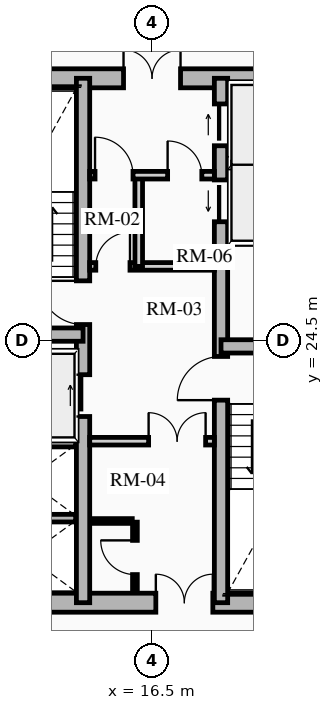
"""IFC4 building model, lengths in metres.
Left out: names, types, materials, properties, quantities, classifications, styles, units other than length and angle.
Written with IfcOpenShell. Run it as: python <this file> out.ifc"""

import sys

from ifc_helpers import new_model, si_unit, direction, frame, frame_2d, origin, place, context, subcontext, project, spatial, rectangle, extrude, source, transform, mapped, element, fill, save


model = new_model("IFC4")
c1 = context("Model", 3, precision=1e-05, world=origin(), true_north=direction((0.0, 1.0)))
c2 = subcontext(c1, "Body", "Model", "MODEL_VIEW")
j1 = project(units=[si_unit("LENGTHUNIT", "METRE"), si_unit("PLANEANGLEUNIT", "RADIAN")], contexts=[c1])
p1 = place(None, origin())
s1 = spatial("IfcSite", under=j1, at=p1, CompositionType="ELEMENT")
p2 = place(p1, origin())
s2 = spatial("IfcBuilding", under=s1, at=p2, CompositionType="ELEMENT")
p3 = place(p2, frame((0.0, 0.0, 22.0)))
s3 = spatial("IfcBuildingStorey", under=s2, at=p3, CompositionType="ELEMENT", Elevation=22.0)
p4 = place(p3, frame((11.15, 17.6, 0.0), z_axis=(0.0, 0.0, 1.0), x_axis=(1.0, 0.0, 0.0)))
e1 = element("IfcWall", 1, at=p4, inside=s3, PredefinedType="SHEAR", context=c2, shape_type="SweptSolid", body=[
    extrude(rectangle(XDim=10.7, YDim=0.5, at=frame_2d((5.35, 0.0))), origin(), (0.0, 0.0, 1.0), 2.91),
])
m1 = source(origin(), c2, "Body", "SweptSolid", [
    extrude(rectangle(XDim=1.5, YDim=2.02, at=frame_2d((0.75, 1.01))), frame((0.0, 0.26, 0.0), z_axis=(0.0, -1.0, 0.0), x_axis=(1.0, 0.0, 0.0)), (0.0, 0.0, 1.0), 0.52),
])
p5 = place(p4, frame((5.45, 0.0, 0.0)))
e2 = element("IfcOpeningElement", 2, at=p5, cuts=e1, PredefinedType="OPENING", context=c2, shape_type="MappedRepresentation", body=[
    mapped(m1, transform((0.0, 0.0, 0.0), x_axis=(1.0, 0.0, 0.0), y_axis=(0.0, 1.0, 0.0), z_axis=(0.0, 0.0, 1.0), scale=1.0)),
])
p6 = place(p3, frame((11.15, 31.4, 0.0), z_axis=(0.0, 0.0, 1.0), x_axis=(1.0, 0.0, 0.0)))
e3 = element("IfcWall", 3, at=p6, inside=s3, PredefinedType="SHEAR", context=c2, shape_type="SweptSolid", body=[
    extrude(rectangle(XDim=10.7, YDim=0.5, at=frame_2d((5.35, 0.0))), origin(), (0.0, 0.0, 1.0), 2.91),
])
p7 = place(p6, frame((4.6, 0.0, 0.0)))
e4 = element("IfcOpeningElement", 4, at=p7, cuts=e3, PredefinedType="OPENING", context=c2, shape_type="MappedRepresentation", body=[
    mapped(m1, transform((0.0, 0.0, 0.0), x_axis=(1.0, 0.0, 0.0), y_axis=(0.0, 1.0, 0.0), z_axis=(0.0, 0.0, 1.0), scale=1.0)),
])
p8 = place(p3, frame((14.685, 17.6, 0.0), z_axis=(0.0, 0.0, 1.0), x_axis=(0.0, 1.0, 0.0)))
e5 = element("IfcWall", 5, at=p8, inside=s3, PredefinedType="SHEAR", context=c2, shape_type="SweptSolid", body=[
    extrude(rectangle(XDim=13.8, YDim=0.35, at=frame_2d((6.9, 0.0))), origin(), (0.0, 0.0, 1.0), 2.91),
])
m2 = source(origin(), c2, "Body", "SweptSolid", [
    extrude(rectangle(XDim=1.1, YDim=2.015, at=frame_2d((0.55, 1.007))), frame((0.0, 0.185, 0.0), z_axis=(0.0, -1.0, 0.0), x_axis=(1.0, 0.0, 0.0)), (0.0, 0.0, 1.0), 0.37),
])
p9 = place(p8, frame((4.9, 0.0, 0.0)))
e6 = element("IfcOpeningElement", 6, at=p9, cuts=e5, PredefinedType="OPENING", context=c2, shape_type="MappedRepresentation", body=[
    mapped(m2, transform((0.0, 0.0, 0.0), x_axis=(1.0, 0.0, 0.0), y_axis=(0.0, 1.0, 0.0), z_axis=(0.0, 0.0, 1.0), scale=1.0)),
])
m3 = source(origin(), c2, "Body", "SweptSolid", [
    extrude(rectangle(XDim=1.15, YDim=2.02, at=frame_2d((0.575, 1.01))), frame((0.0, 0.185, 0.0), z_axis=(0.0, -1.0, 0.0), x_axis=(1.0, 0.0, 0.0)), (0.0, 0.0, 1.0), 0.37),
])
p10 = place(p8, frame((7.32, 0.0, 0.0)))
e7 = element("IfcOpeningElement", 7, at=p10, cuts=e5, PredefinedType="OPENING", context=c2, shape_type="MappedRepresentation", body=[
    mapped(m3, transform((0.0, 0.0, 0.0), x_axis=(1.0, 0.0, 0.0), y_axis=(0.0, 1.0, 0.0), z_axis=(0.0, 0.0, 1.0), scale=1.0)),
])
p11 = place(p3, frame((18.315, 17.6, 0.0), z_axis=(0.0, 0.0, 1.0), x_axis=(0.0, 1.0, 0.0)))
e8 = element("IfcWall", 8, at=p11, inside=s3, PredefinedType="SHEAR", context=c2, shape_type="SweptSolid", body=[
    extrude(rectangle(XDim=13.8, YDim=0.35, at=frame_2d((6.9, 0.0))), origin(), (0.0, 0.0, 1.0), 2.91),
])
p12 = place(p11, frame((10.025, 0.0, 0.0)))
e9 = element("IfcOpeningElement", 9, at=p12, cuts=e8, PredefinedType="OPENING", context=c2, shape_type="MappedRepresentation", body=[
    mapped(m2, transform((0.0, 0.0, 0.0), x_axis=(1.0, 0.0, 0.0), y_axis=(0.0, 1.0, 0.0), z_axis=(0.0, 0.0, 1.0), scale=1.0)),
])
p13 = place(p11, frame((12.025, 0.0, 0.0)))
e10 = element("IfcOpeningElement", 10, at=p13, cuts=e8, PredefinedType="OPENING", context=c2, shape_type="MappedRepresentation", body=[
    mapped(m2, transform((0.0, 0.0, 0.0), x_axis=(1.0, 0.0, 0.0), y_axis=(0.0, 1.0, 0.0), z_axis=(0.0, 0.0, 1.0), scale=1.0)),
])
p14 = place(p11, frame((5.33, 0.0, 0.0)))
e11 = element("IfcOpeningElement", 11, at=p14, cuts=e8, PredefinedType="OPENING", context=c2, shape_type="MappedRepresentation", body=[
    mapped(m3, transform((0.0, 0.0, 0.0), x_axis=(1.0, 0.0, 0.0), y_axis=(0.0, 1.0, 0.0), z_axis=(0.0, 0.0, 1.0), scale=1.0)),
])
for number, where, z_axis, x_axis in (
    (12, (11.4, 24.655, 0.0), (0.0, 0.0, 1.0), (1.0, 0.0, 0.0)),
    (13, (18.315, 24.345, 0.0), (0.0, 0.0, 1.0), (1.0, 0.0, 0.0)),
):
    element("IfcWall", number, at=place(p3, frame(where, z_axis=z_axis, x_axis=x_axis)), inside=s3, PredefinedType="SHEAR", context=c2, shape_type="SweptSolid", body=[
        extrude(rectangle(XDim=3.285, YDim=0.35, at=frame_2d((1.643, 0.0))), origin(), (0.0, 0.0, 1.0), 2.91),
    ])
for number, where, z_axis, x_axis in (
    (14, (11.52, 21.8, 0.0), (0.0, 0.0, 1.0), (1.0, 0.0, 0.0)),
    (15, (11.52, 19.825, 0.0), (0.0, 0.0, 1.0), (1.0, 0.0, 0.0)),
    (16, (18.51, 27.13, 0.0), (0.0, 0.0, 1.0), (1.0, 0.0, 0.0)),
    (17, (18.51, 29.175, 0.0), (0.0, 0.0, 1.0), (1.0, 0.0, 0.0)),
):
    element("IfcWall", number, at=place(p3, frame(where, z_axis=z_axis, x_axis=x_axis)), inside=s3, PredefinedType="SHEAR", context=c2, shape_type="SweptSolid", body=[
        extrude(rectangle(XDim=2.97, YDim=0.2, at=frame_2d((1.485, 0.0))), origin(), (0.0, 0.0, 1.0), 2.91),
    ])
p15 = place(p3, frame((14.86, 21.85, 0.0), z_axis=(0.0, 0.0, 1.0), x_axis=(1.0, 0.0, 0.0)))
e18 = element("IfcWall", 18, at=p15, inside=s3, PredefinedType="PARTITIONING", context=c2, shape_type="SweptSolid", body=[
    extrude(rectangle(XDim=3.28, YDim=0.2, at=frame_2d((1.64, 0.0))), origin(), (0.0, 0.0, 1.0), 2.635),
])
m4 = source(origin(), c2, "Body", "SweptSolid", [
    extrude(rectangle(XDim=1.5, YDim=2.02, at=frame_2d((0.75, 1.01))), frame((0.0, 0.11, 0.0), z_axis=(0.0, -1.0, 0.0), x_axis=(1.0, 0.0, 0.0)), (0.0, 0.0, 1.0), 0.22),
])
p16 = place(p15, frame((1.55, 0.0, 0.0)))
e19 = element("IfcOpeningElement", 19, at=p16, cuts=e18, PredefinedType="OPENING", context=c2, shape_type="MappedRepresentation", body=[
    mapped(m4, transform((0.0, 0.0, 0.0), x_axis=(1.0, 0.0, 0.0), y_axis=(0.0, 1.0, 0.0), z_axis=(0.0, 0.0, 1.0), scale=1.0)),
])
p17 = place(p3, frame((14.86, 26.45, 0.0), z_axis=(0.0, 0.0, 1.0), x_axis=(1.0, 0.0, 0.0)))
e20 = element("IfcWall", 20, at=p17, inside=s3, PredefinedType="PARTITIONING", context=c2, shape_type="SweptSolid", body=[
    extrude(rectangle(XDim=3.28, YDim=0.2, at=frame_2d((1.64, 0.0))), origin(), (0.0, 0.0, 1.0), 2.635),
])
m5 = source(origin(), c2, "Body", "SweptSolid", [
    extrude(rectangle(XDim=0.9, YDim=2.005, at=frame_2d((0.45, 1.002))), frame((0.0, 0.11, 0.0), z_axis=(0.0, -1.0, 0.0), x_axis=(1.0, 0.0, 0.0)), (0.0, 0.0, 1.0), 0.22),
])
p18 = place(p17, frame((0.16, 0.0, 0.0)))
e21 = element("IfcOpeningElement", 21, at=p18, cuts=e20, PredefinedType="OPENING", context=c2, shape_type="MappedRepresentation", body=[
    mapped(m5, transform((0.0, 0.0, 0.0), x_axis=(1.0, 0.0, 0.0), y_axis=(0.0, 1.0, 0.0), z_axis=(0.0, 0.0, 1.0), scale=1.0)),
])
p19 = place(p3, frame((16.15, 26.45, 0.0), z_axis=(0.0, 0.0, 1.0), x_axis=(0.0, 1.0, 0.0)))
e22 = element("IfcWall", 22, at=p19, inside=s3, PredefinedType="PARTITIONING", context=c2, shape_type="SweptSolid", body=[
    extrude(rectangle(XDim=2.4, YDim=0.2, at=frame_2d((1.2, 0.0))), origin(), (0.0, 0.0, 1.0), 2.635),
])
p20 = place(p3, frame((14.86, 28.85, 0.0), z_axis=(0.0, 0.0, 1.0), x_axis=(1.0, 0.0, 0.0)))
e23 = element("IfcWall", 23, at=p20, inside=s3, PredefinedType="PARTITIONING", context=c2, shape_type="SweptSolid", body=[
    extrude(rectangle(XDim=3.28, YDim=0.2, at=frame_2d((1.64, 0.0))), origin(), (0.0, 0.0, 1.0), 2.635),
])
m6 = source(origin(), c2, "Body", "SweptSolid", [
    extrude(rectangle(XDim=1.0, YDim=2.015, at=frame_2d((0.5, 1.007))), frame((0.0, 0.11, 0.0), z_axis=(0.0, -1.0, 0.0), x_axis=(1.0, 0.0, 0.0)), (0.0, 0.0, 1.0), 0.22),
])
p21 = place(p20, frame((0.14, 0.0, 0.0)))
e24 = element("IfcOpeningElement", 24, at=p21, cuts=e23, PredefinedType="OPENING", context=c2, shape_type="MappedRepresentation", body=[
    mapped(m6, transform((0.0, 0.0, 0.0), x_axis=(1.0, 0.0, 0.0), y_axis=(0.0, 1.0, 0.0), z_axis=(0.0, 0.0, 1.0), scale=1.0)),
])
p22 = place(p20, frame((2.05, 0.0, 0.0)))
e25 = element("IfcOpeningElement", 25, at=p22, cuts=e23, PredefinedType="OPENING", context=c2, shape_type="MappedRepresentation", body=[
    mapped(m5, transform((0.0, 0.0, 0.0), x_axis=(1.0, 0.0, 0.0), y_axis=(0.0, 1.0, 0.0), z_axis=(0.0, 0.0, 1.0), scale=1.0)),
])
p23 = place(p3, frame((16.05, 17.92, 0.0), z_axis=(0.0, 0.0, 1.0), x_axis=(0.0, 1.0, 0.0)))
e26 = element("IfcWall", 26, at=p23, inside=s3, PredefinedType="PARTITIONING", context=c2, shape_type="SweptSolid", body=[
    extrude(rectangle(XDim=1.8, YDim=0.125, at=frame_2d((0.9, 0.0))), origin(), (0.0, 0.0, 1.0), 2.635),
])
m7 = source(origin(), c2, "Body", "SweptSolid", [
    extrude(rectangle(XDim=0.9, YDim=2.005, at=frame_2d((0.45, 1.002))), frame((0.0, 0.073, 0.0), z_axis=(0.0, -1.0, 0.0), x_axis=(1.0, 0.0, 0.0)), (0.0, 0.0, 1.0), 0.145),
])
p24 = place(p23, frame((0.42, 0.0, 0.0)))
e27 = element("IfcOpeningElement", 27, at=p24, cuts=e26, PredefinedType="OPENING", context=c2, shape_type="MappedRepresentation", body=[
    mapped(m7, transform((0.0, 0.0, 0.0), x_axis=(1.0, 0.0, 0.0), y_axis=(0.0, 1.0, 0.0), z_axis=(0.0, 0.0, 1.0), scale=1.0)),
])
p25 = place(p3, frame((14.88, 19.75, 0.0), z_axis=(0.0, 0.0, 1.0), x_axis=(1.0, 0.0, 0.0)))
e28 = element("IfcWall", 28, at=p25, inside=s3, PredefinedType="PARTITIONING", context=c2, shape_type="SweptSolid", body=[
    extrude(rectangle(XDim=1.1, YDim=0.125, at=frame_2d((0.55, 0.0))), origin(), (0.0, 0.0, 1.0), 2.635),
])
m8 = source(origin(), c2, "Body", "SweptSolid", [
    extrude(rectangle(XDim=1.1, YDim=2.015, at=frame_2d((0.55, 1.007))), frame((0.0, 0.025, 0.0), z_axis=(0.0, -1.0, 0.0), x_axis=(1.0, 0.0, 0.0)), (0.0, 0.0, 1.0), 0.05),
])
p26 = place(p9, origin())
e29 = element("IfcDoor", 29, at=p26, inside=s3, OperationType="SLIDING_TO_RIGHT", PredefinedType="DOOR", context=c2, shape_type="MappedRepresentation", body=[
    mapped(m8, transform((0.0, 0.0, 0.0), x_axis=(1.0, 0.0, 0.0), y_axis=(0.0, 1.0, 0.0), z_axis=(0.0, 0.0, 1.0), scale=1.0)),
])
fill(e6, e29)
p27 = place(p12, origin())
e30 = element("IfcDoor", 30, at=p27, inside=s3, OperationType="SLIDING_TO_LEFT", PredefinedType="DOOR", context=c2, shape_type="MappedRepresentation", body=[
    mapped(m8, transform((0.0, 0.0, 0.0), x_axis=(1.0, 0.0, 0.0), y_axis=(0.0, 1.0, 0.0), z_axis=(0.0, 0.0, 1.0), scale=1.0)),
])
fill(e9, e30)
p28 = place(p13, origin())
e31 = element("IfcDoor", 31, at=p28, inside=s3, OperationType="SLIDING_TO_RIGHT", PredefinedType="DOOR", context=c2, shape_type="MappedRepresentation", body=[
    mapped(m8, transform((0.0, 0.0, 0.0), x_axis=(1.0, 0.0, 0.0), y_axis=(0.0, 1.0, 0.0), z_axis=(0.0, 0.0, 1.0), scale=1.0)),
])
fill(e10, e31)
m9 = source(origin(), c2, "Body", "SweptSolid", [
    extrude(rectangle(XDim=1.15, YDim=2.02, at=frame_2d((0.575, 1.01))), frame((0.0, 0.025, 0.0), z_axis=(0.0, -1.0, 0.0), x_axis=(1.0, 0.0, 0.0)), (0.0, 0.0, 1.0), 0.05),
])
p29 = place(p10, origin())
e32 = element("IfcDoor", 32, at=p29, inside=s3, OperationType="SINGLE_SWING_RIGHT", PredefinedType="DOOR", context=c2, shape_type="MappedRepresentation", body=[
    mapped(m9, transform((0.0, 0.0, 0.0), x_axis=(1.0, 0.0, 0.0), y_axis=(0.0, 1.0, 0.0), z_axis=(0.0, 0.0, 1.0), scale=1.0)),
])
fill(e7, e32)
p30 = place(p14, origin())
e33 = element("IfcDoor", 33, at=p30, inside=s3, OperationType="SINGLE_SWING_LEFT", PredefinedType="DOOR", context=c2, shape_type="MappedRepresentation", body=[
    mapped(m9, transform((0.0, 0.0, 0.0), x_axis=(1.0, 0.0, 0.0), y_axis=(0.0, 1.0, 0.0), z_axis=(0.0, 0.0, 1.0), scale=1.0)),
])
fill(e11, e33)
m10 = source(origin(), c2, "Body", "SweptSolid", [
    extrude(rectangle(XDim=1.5, YDim=2.02, at=frame_2d((0.75, 1.01))), frame((0.0, 0.025, 0.0), z_axis=(0.0, -1.0, 0.0), x_axis=(1.0, 0.0, 0.0)), (0.0, 0.0, 1.0), 0.05),
])
p31 = place(p7, origin())
e34 = element("IfcDoor", 34, at=p31, inside=s3, OperationType="DOUBLE_DOOR_SINGLE_SWING", PredefinedType="DOOR", context=c2, shape_type="MappedRepresentation", body=[
    mapped(m10, transform((0.0, 0.0, 0.0), x_axis=(1.0, 0.0, 0.0), y_axis=(0.0, 1.0, 0.0), z_axis=(0.0, 0.0, 1.0), scale=1.0)),
])
fill(e4, e34)
p32 = place(p5, origin())
e35 = element("IfcDoor", 35, at=p32, inside=s3, OperationType="DOUBLE_DOOR_SINGLE_SWING", PredefinedType="DOOR", context=c2, shape_type="MappedRepresentation", body=[
    mapped(m10, transform((0.0, 0.0, 0.0), x_axis=(1.0, 0.0, 0.0), y_axis=(0.0, 1.0, 0.0), z_axis=(0.0, 0.0, 1.0), scale=1.0)),
])
fill(e2, e35)
p33 = place(p16, origin())
e36 = element("IfcDoor", 36, at=p33, inside=s3, OperationType="DOUBLE_DOOR_SINGLE_SWING", PredefinedType="DOOR", context=c2, shape_type="MappedRepresentation", body=[
    mapped(m10, transform((0.0, 0.0, 0.0), x_axis=(1.0, 0.0, 0.0), y_axis=(0.0, 1.0, 0.0), z_axis=(0.0, 0.0, 1.0), scale=1.0)),
])
fill(e19, e36)
m11 = source(origin(), c2, "Body", "SweptSolid", [
    extrude(rectangle(XDim=0.9, YDim=2.005, at=frame_2d((0.45, 1.002))), frame((0.0, 0.025, 0.0), z_axis=(0.0, -1.0, 0.0), x_axis=(1.0, 0.0, 0.0)), (0.0, 0.0, 1.0), 0.05),
])
p34 = place(p18, origin())
e37 = element("IfcDoor", 37, at=p34, inside=s3, OperationType="SINGLE_SWING_RIGHT", PredefinedType="DOOR", context=c2, shape_type="MappedRepresentation", body=[
    mapped(m11, transform((0.0, 0.0, 0.0), x_axis=(1.0, 0.0, 0.0), y_axis=(0.0, 1.0, 0.0), z_axis=(0.0, 0.0, 1.0), scale=1.0)),
])
fill(e21, e37)
m12 = source(origin(), c2, "Body", "SweptSolid", [
    extrude(rectangle(XDim=1.0, YDim=2.015, at=frame_2d((0.5, 1.007))), frame((0.0, 0.025, 0.0), z_axis=(0.0, -1.0, 0.0), x_axis=(1.0, 0.0, 0.0)), (0.0, 0.0, 1.0), 0.05),
])
p35 = place(p21, origin())
e38 = element("IfcDoor", 38, at=p35, inside=s3, OperationType="SINGLE_SWING_LEFT", PredefinedType="DOOR", context=c2, shape_type="MappedRepresentation", body=[
    mapped(m12, transform((0.0, 0.0, 0.0), x_axis=(1.0, 0.0, 0.0), y_axis=(0.0, 1.0, 0.0), z_axis=(0.0, 0.0, 1.0), scale=1.0)),
])
fill(e24, e38)
p36 = place(p24, origin())
e39 = element("IfcDoor", 39, at=p36, inside=s3, OperationType="SINGLE_SWING_RIGHT", PredefinedType="DOOR", context=c2, shape_type="MappedRepresentation", body=[
    mapped(m11, transform((0.0, 0.0, 0.0), x_axis=(1.0, 0.0, 0.0), y_axis=(0.0, 1.0, 0.0), z_axis=(0.0, 0.0, 1.0), scale=1.0)),
])
fill(e27, e39)
p37 = place(p22, origin())
e40 = element("IfcDoor", 40, at=p37, inside=s3, OperationType="SINGLE_SWING_LEFT", PredefinedType="DOOR", context=c2, shape_type="MappedRepresentation", body=[
    mapped(m11, transform((0.0, 0.0, 0.0), x_axis=(1.0, 0.0, 0.0), y_axis=(0.0, 1.0, 0.0), z_axis=(0.0, 0.0, 1.0), scale=1.0)),
])
fill(e25, e40)
save(model, sys.argv[1])
